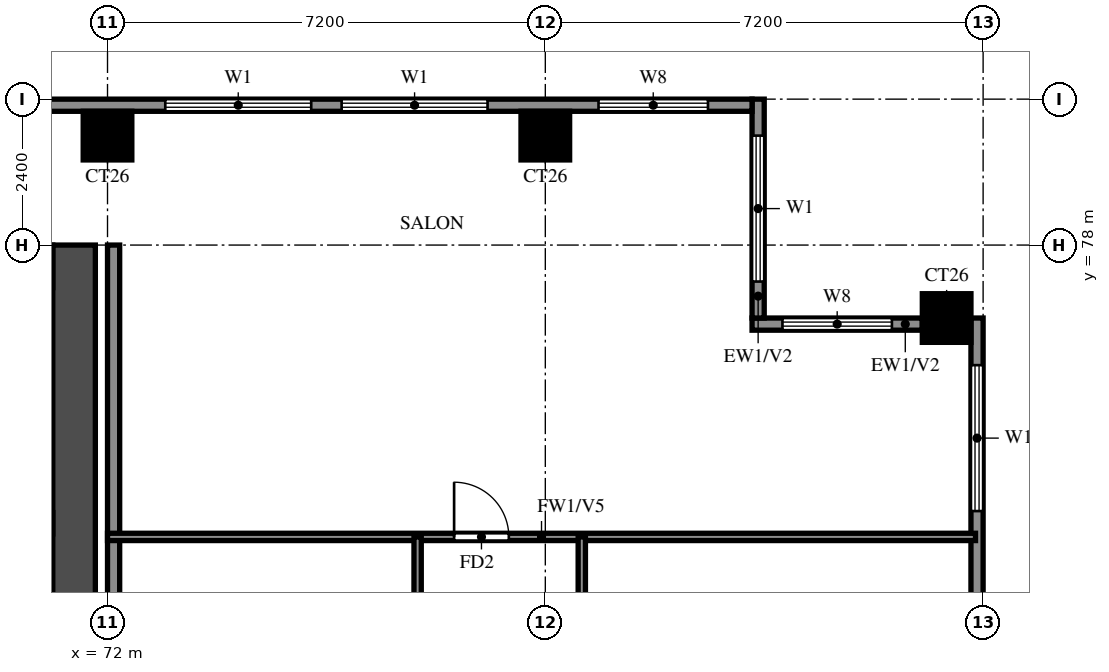
"""IFC4 building model, lengths in metres.
Left out: names, types, materials, properties, quantities, classifications, styles, units other than length and angle.
Written with IfcOpenShell. Run it as: python <this file> out.ifc"""

import sys

from ifc_helpers import new_model, si_unit, direction, frame, frame_2d, origin, origin_2d, place, context, subcontext, project, spatial, rectangle, extrude, source, transform, mapped, element, fill, save


model = new_model("IFC4")
c1 = context("Model", 3, precision=1e-05, world=origin(), true_north=direction((0.0, 1.0)))
c2 = subcontext(c1, "Body", "Model", "MODEL_VIEW")
j1 = project(units=[si_unit("LENGTHUNIT", "METRE"), si_unit("PLANEANGLEUNIT", "RADIAN")], contexts=[c1])
p1 = place(None, origin())
s1 = spatial("IfcSite", under=j1, at=p1, CompositionType="ELEMENT")
p2 = place(p1, origin())
s2 = spatial("IfcBuilding", under=s1, at=p2, CompositionType="ELEMENT")
p3 = place(p2, frame((0.0, 0.0, 181.5)))
s3 = spatial("IfcBuildingStorey", under=s2, at=p3, CompositionType="ELEMENT", Elevation=181.5)
m1 = source(origin(), c2, "Body", "SweptSolid", [
    extrude(rectangle(XDim=0.8, YDim=0.8, at=origin_2d()), origin(), (0.0, 0.0, 1.0), 3.2),
])
for number, where, z_axis, x_axis in (
    (1, (85.8, 76.8, 0.0), (0.0, 0.0, 1.0), (1.0, 0.0, 0.0)),
    (2, (72.0, 79.8, 0.0), (0.0, 0.0, 1.0), (1.0, 0.0, 0.0)),
    (3, (79.2, 79.8, 0.0), (0.0, 0.0, 1.0), (1.0, 0.0, 0.0)),
):
    element("IfcColumn", number, at=place(p3, frame(where, z_axis=z_axis, x_axis=x_axis)), inside=s3, PredefinedType="COLUMN", context=c2, shape_type="MappedRepresentation", body=[
        mapped(m1, transform((0.0, 0.0, 0.0))),
    ])
p4 = place(p3, frame((71.45, 66.1, 0.0), z_axis=(0.0, 0.0, 1.0), x_axis=(0.0, 1.0, 0.0)))
e4 = element("IfcWall", 4, at=p4, inside=s3, PredefinedType="SHEAR", context=c2, shape_type="SweptSolid", body=[
    extrude(rectangle(XDim=11.9, YDim=0.7, at=frame_2d((5.95, 0.0))), origin(), (0.0, 0.0, 1.0), 3.2),
])
p5 = place(p3, frame((29.7, 77.65, 0.0), z_axis=(0.0, 0.0, 1.0), x_axis=(1.0, 0.0, 0.0)))
e5 = element("IfcWall", 5, at=p5, inside=s3, PredefinedType="SHEAR", context=c2, shape_type="SweptSolid", body=[
    extrude(rectangle(XDim=41.4, YDim=0.7, at=frame_2d((20.7, 0.0))), origin(), (0.0, 0.0, 1.0), 3.2),
])
p6 = place(p3, frame((86.3, 62.4, 0.0), z_axis=(0.0, 0.0, 1.0), x_axis=(0.0, 1.0, 0.0)))
e6 = element("IfcWall", 6, at=p6, inside=s3, PredefinedType="SOLIDWALL", context=c2, shape_type="SweptSolid", body=[
    extrude(rectangle(XDim=14.4, YDim=0.2, at=frame_2d((7.2, 0.0))), origin(), (0.0, 0.0, 1.0), 3.2),
])
p7 = place(p6, frame((0.95, 0.0, 0.6)))
e7 = element("IfcOpeningElement", 7, at=p7, cuts=e6, PredefinedType="OPENING", context=c2, shape_type="SweptSolid", body=[
    extrude(rectangle(XDim=2.4, YDim=2.4, at=frame_2d((1.2, 1.2))), frame((0.0, 0.11, 0.0), z_axis=(0.0, -1.0, 0.0), x_axis=(1.0, 0.0, 0.0)), (0.0, 0.0, 1.0), 0.22),
])
p8 = place(p6, frame((3.85, 0.0, 0.6)))
e8 = element("IfcOpeningElement", 8, at=p8, cuts=e6, PredefinedType="OPENING", context=c2, shape_type="SweptSolid", body=[
    extrude(rectangle(XDim=2.4, YDim=2.4, at=frame_2d((1.2, 1.2))), frame((0.0, 0.11, 0.0), z_axis=(0.0, -1.0, 0.0), x_axis=(1.0, 0.0, 0.0)), (0.0, 0.0, 1.0), 0.22),
])
p9 = place(p6, frame((8.725, 0.0, 1.5)))
e9 = element("IfcOpeningElement", 9, at=p9, cuts=e6, PredefinedType="OPENING", context=c2, shape_type="SweptSolid", body=[
    extrude(rectangle(XDim=0.9, YDim=0.9, at=frame_2d((0.45, 0.45))), frame((0.0, 0.11, 0.0), z_axis=(0.0, -1.0, 0.0), x_axis=(1.0, 0.0, 0.0)), (0.0, 0.0, 1.0), 0.22),
])
p10 = place(p6, frame((11.225, 0.0, 0.6)))
e10 = element("IfcOpeningElement", 10, at=p10, cuts=e6, PredefinedType="OPENING", context=c2, shape_type="SweptSolid", body=[
    extrude(rectangle(XDim=2.4, YDim=2.4, at=frame_2d((1.2, 1.2))), frame((0.0, 0.11, 0.0), z_axis=(0.0, -1.0, 0.0), x_axis=(1.0, 0.0, 0.0)), (0.0, 0.0, 1.0), 0.22),
])
p11 = place(p3, frame((85.4, 76.7, 0.0), z_axis=(0.0, 0.0, 1.0), x_axis=(-1.0, 0.0, 0.0)))
e11 = element("IfcWall", 11, at=p11, inside=s3, PredefinedType="SOLIDWALL", context=c2, shape_type="SweptSolid", body=[
    extrude(rectangle(XDim=2.8, YDim=0.2, at=frame_2d((1.4, 0.0))), origin(), (0.0, 0.0, 1.0), 3.2),
])
p12 = place(p11, frame((0.5, 0.0, 0.6)))
e12 = element("IfcOpeningElement", 12, at=p12, cuts=e11, PredefinedType="OPENING", context=c2, shape_type="SweptSolid", body=[
    extrude(rectangle(XDim=1.8, YDim=2.4, at=frame_2d((0.9, 1.2))), frame((0.0, 0.11, 0.0), z_axis=(0.0, -1.0, 0.0), x_axis=(1.0, 0.0, 0.0)), (0.0, 0.0, 1.0), 0.22),
])
p13 = place(p3, frame((82.7, 76.8, 0.0), z_axis=(0.0, 0.0, 1.0), x_axis=(0.0, 1.0, 0.0)))
e13 = element("IfcWall", 13, at=p13, inside=s3, PredefinedType="SOLIDWALL", context=c2, shape_type="SweptSolid", body=[
    extrude(rectangle(XDim=3.6, YDim=0.2, at=frame_2d((1.8, 0.0))), origin(), (0.0, 0.0, 1.0), 3.2),
])
p14 = place(p13, frame((0.6, 0.0, 0.6)))
e14 = element("IfcOpeningElement", 14, at=p14, cuts=e13, PredefinedType="OPENING", context=c2, shape_type="SweptSolid", body=[
    extrude(rectangle(XDim=2.4, YDim=2.4, at=frame_2d((1.2, 1.2))), frame((0.0, 0.11, 0.0), z_axis=(0.0, -1.0, 0.0), x_axis=(1.0, 0.0, 0.0)), (0.0, 0.0, 1.0), 0.22),
])
p15 = place(p3, frame((82.6, 80.3, 0.0), z_axis=(0.0, 0.0, 1.0), x_axis=(-1.0, 0.0, 0.0)))
e15 = element("IfcWall", 15, at=p15, inside=s3, PredefinedType="SOLIDWALL", context=c2, shape_type="SweptSolid", body=[
    extrude(rectangle(XDim=64.6, YDim=0.2, at=frame_2d((32.3, 0.0))), origin(), (0.0, 0.0, 1.0), 3.2),
])
p16 = place(p15, frame((54.7, 0.0, 0.0)))
e16 = element("IfcOpeningElement", 16, at=p16, cuts=e15, PredefinedType="OPENING", context=c2, shape_type="SweptSolid", body=[
    extrude(rectangle(XDim=1.8, YDim=2.4, at=frame_2d((0.9, 1.2))), frame((0.0, 0.11, 0.0), z_axis=(0.0, -1.0, 0.0), x_axis=(1.0, 0.0, 0.0)), (0.0, 0.0, 1.0), 0.22),
])
p17 = place(p15, frame((56.95, 0.0, 0.6)))
e17 = element("IfcOpeningElement", 17, at=p17, cuts=e15, PredefinedType="OPENING", context=c2, shape_type="SweptSolid", body=[
    extrude(rectangle(XDim=0.9, YDim=2.4, at=frame_2d((0.45, 1.2))), frame((0.0, 0.11, 0.0), z_axis=(0.0, -1.0, 0.0), x_axis=(1.0, 0.0, 0.0)), (0.0, 0.0, 1.0), 0.22),
])
p18 = place(p15, frame((58.725, 0.0, 0.6)))
e18 = element("IfcOpeningElement", 18, at=p18, cuts=e15, PredefinedType="OPENING", context=c2, shape_type="SweptSolid", body=[
    extrude(rectangle(XDim=1.8, YDim=2.4, at=frame_2d((0.9, 1.2))), frame((0.0, 0.11, 0.0), z_axis=(0.0, -1.0, 0.0), x_axis=(1.0, 0.0, 0.0)), (0.0, 0.0, 1.0), 0.22),
])
p19 = place(p15, frame((61.975, 0.0, 0.6)))
e19 = element("IfcOpeningElement", 19, at=p19, cuts=e15, PredefinedType="OPENING", context=c2, shape_type="SweptSolid", body=[
    extrude(rectangle(XDim=1.8, YDim=2.4, at=frame_2d((0.9, 1.2))), frame((0.0, 0.11, 0.0), z_axis=(0.0, -1.0, 0.0), x_axis=(1.0, 0.0, 0.0)), (0.0, 0.0, 1.0), 0.22),
])
p20 = place(p15, frame((0.725, 0.0, 0.6)))
e20 = element("IfcOpeningElement", 20, at=p20, cuts=e15, PredefinedType="OPENING", context=c2, shape_type="SweptSolid", body=[
    extrude(rectangle(XDim=1.8, YDim=2.4, at=frame_2d((0.9, 1.2))), frame((0.0, 0.11, 0.0), z_axis=(0.0, -1.0, 0.0), x_axis=(1.0, 0.0, 0.0)), (0.0, 0.0, 1.0), 0.22),
])
p21 = place(p15, frame((4.35, 0.0, 0.6)))
e21 = element("IfcOpeningElement", 21, at=p21, cuts=e15, PredefinedType="OPENING", context=c2, shape_type="SweptSolid", body=[
    extrude(rectangle(XDim=2.4, YDim=2.4, at=frame_2d((1.2, 1.2))), frame((0.0, 0.11, 0.0), z_axis=(0.0, -1.0, 0.0), x_axis=(1.0, 0.0, 0.0)), (0.0, 0.0, 1.0), 0.22),
])
p22 = place(p15, frame((7.25, 0.0, 0.6)))
e22 = element("IfcOpeningElement", 22, at=p22, cuts=e15, PredefinedType="OPENING", context=c2, shape_type="SweptSolid", body=[
    extrude(rectangle(XDim=2.4, YDim=2.4, at=frame_2d((1.2, 1.2))), frame((0.0, 0.11, 0.0), z_axis=(0.0, -1.0, 0.0), x_axis=(1.0, 0.0, 0.0)), (0.0, 0.0, 1.0), 0.22),
])
p23 = place(p3, frame((72.1, 62.4, 0.0), z_axis=(0.0, 0.0, 1.0), x_axis=(0.0, 1.0, 0.0)))
e23 = element("IfcWall", 23, at=p23, inside=s3, PredefinedType="SOLIDWALL", context=c2, shape_type="SweptSolid", body=[
    extrude(rectangle(XDim=15.6, YDim=0.2, at=frame_2d((7.8, 0.0))), origin(), (0.0, 0.0, 1.0), 3.2),
])
p24 = place(p3, frame((72.0, 73.2, 0.0), z_axis=(0.0, 0.0, 1.0), x_axis=(1.0, 0.0, 0.0)))
e24 = element("IfcWall", 24, at=p24, inside=s3, PredefinedType="PARTITIONING", context=c2, shape_type="SweptSolid", body=[
    extrude(rectangle(XDim=14.275, YDim=0.12, at=frame_2d((7.137, 0.0))), origin(), (0.0, 0.0, 1.0), 2.3),
])
p25 = place(p24, frame((5.7, 0.0, 0.0)))
e25 = element("IfcOpeningElement", 25, at=p25, cuts=e24, PredefinedType="OPENING", context=c2, shape_type="SweptSolid", body=[
    extrude(rectangle(XDim=0.9, YDim=2.1, at=frame_2d((0.45, 1.05))), frame((0.0, 0.07, 0.0), z_axis=(0.0, -1.0, 0.0), x_axis=(1.0, 0.0, 0.0)), (0.0, 0.0, 1.0), 0.14),
])
p26 = place(p3, frame((77.1, 61.2, 0.0), z_axis=(0.0, 0.0, 1.0), x_axis=(0.0, 1.0, 0.0)))
e26 = element("IfcWall", 26, at=p26, inside=s3, PredefinedType="PARTITIONING", context=c2, shape_type="SweptSolid", body=[
    extrude(rectangle(XDim=12.0, YDim=0.12, at=frame_2d((6.0, 0.0))), origin(), (0.0, 0.0, 1.0), 3.2),
])
p27 = place(p26, frame((4.55, 0.0, 0.0)))
e27 = element("IfcOpeningElement", 27, at=p27, cuts=e26, PredefinedType="OPENING", context=c2, shape_type="SweptSolid", body=[
    extrude(rectangle(XDim=0.9, YDim=2.1, at=frame_2d((0.45, 1.05))), frame((0.0, 0.07, 0.0), z_axis=(0.0, -1.0, 0.0), x_axis=(1.0, 0.0, 0.0)), (0.0, 0.0, 1.0), 0.14),
])
p28 = place(p26, frame((9.3, 0.0, 0.0)))
e28 = element("IfcOpeningElement", 28, at=p28, cuts=e26, PredefinedType="OPENING", context=c2, shape_type="SweptSolid", body=[
    extrude(rectangle(XDim=0.8, YDim=2.1, at=frame_2d((0.4, 1.05))), frame((0.0, 0.07, 0.0), z_axis=(0.0, -1.0, 0.0), x_axis=(1.0, 0.0, 0.0)), (0.0, 0.0, 1.0), 0.14),
])
p29 = place(p3, frame((79.8, 69.6, 0.0), z_axis=(0.0, 0.0, 1.0), x_axis=(0.0, 1.0, 0.0)))
e29 = element("IfcWall", 29, at=p29, inside=s3, PredefinedType="PARTITIONING", context=c2, shape_type="SweptSolid", body=[
    extrude(rectangle(XDim=3.6, YDim=0.12, at=frame_2d((1.8, 0.0))), origin(), (0.0, 0.0, 1.0), 3.2),
])
p30 = place(p10, origin())
e30 = element("IfcWindow", 30, at=p30, inside=s3, PartitioningType="DOUBLE_PANEL_VERTICAL", PredefinedType="WINDOW", context=c2, shape_type="SweptSolid", body=[
    extrude(rectangle(XDim=2.4, YDim=2.4, at=frame_2d((1.2, 1.2))), frame((0.0, 0.03, 0.0), z_axis=(0.0, -1.0, 0.0), x_axis=(1.0, 0.0, 0.0)), (0.0, 0.0, 1.0), 0.06),
])
fill(e10, e30)
p31 = place(p12, origin())
e31 = element("IfcWindow", 31, at=p31, inside=s3, PartitioningType="DOUBLE_PANEL_VERTICAL", PredefinedType="WINDOW", context=c2, shape_type="SweptSolid", body=[
    extrude(rectangle(XDim=1.8, YDim=2.4, at=frame_2d((0.9, 1.2))), frame((0.0, 0.03, 0.0), z_axis=(0.0, -1.0, 0.0), x_axis=(1.0, 0.0, 0.0)), (0.0, 0.0, 1.0), 0.06),
])
fill(e12, e31)
p32 = place(p14, origin())
e32 = element("IfcWindow", 32, at=p32, inside=s3, PartitioningType="DOUBLE_PANEL_VERTICAL", PredefinedType="WINDOW", context=c2, shape_type="SweptSolid", body=[
    extrude(rectangle(XDim=2.4, YDim=2.4, at=frame_2d((1.2, 1.2))), frame((0.0, 0.03, 0.0), z_axis=(0.0, -1.0, 0.0), x_axis=(1.0, 0.0, 0.0)), (0.0, 0.0, 1.0), 0.06),
])
fill(e14, e32)
p33 = place(p20, origin())
e33 = element("IfcWindow", 33, at=p33, inside=s3, PartitioningType="DOUBLE_PANEL_VERTICAL", PredefinedType="WINDOW", context=c2, shape_type="SweptSolid", body=[
    extrude(rectangle(XDim=1.8, YDim=2.4, at=frame_2d((0.9, 1.2))), frame((0.0, 0.03, 0.0), z_axis=(0.0, -1.0, 0.0), x_axis=(1.0, 0.0, 0.0)), (0.0, 0.0, 1.0), 0.06),
])
fill(e20, e33)
p34 = place(p21, origin())
e34 = element("IfcWindow", 34, at=p34, inside=s3, PartitioningType="DOUBLE_PANEL_VERTICAL", PredefinedType="WINDOW", context=c2, shape_type="SweptSolid", body=[
    extrude(rectangle(XDim=2.4, YDim=2.4, at=frame_2d((1.2, 1.2))), frame((0.0, 0.03, 0.0), z_axis=(0.0, -1.0, 0.0), x_axis=(1.0, 0.0, 0.0)), (0.0, 0.0, 1.0), 0.06),
])
fill(e21, e34)
p35 = place(p22, origin())
e35 = element("IfcWindow", 35, at=p35, inside=s3, PartitioningType="DOUBLE_PANEL_VERTICAL", PredefinedType="WINDOW", context=c2, shape_type="SweptSolid", body=[
    extrude(rectangle(XDim=2.4, YDim=2.4, at=frame_2d((1.2, 1.2))), frame((0.0, 0.03, 0.0), z_axis=(0.0, -1.0, 0.0), x_axis=(1.0, 0.0, 0.0)), (0.0, 0.0, 1.0), 0.06),
])
fill(e22, e35)
p36 = place(p25, origin())
e36 = element("IfcDoor", 36, at=p36, inside=s3, OperationType="SINGLE_SWING_LEFT", PredefinedType="DOOR", context=c2, shape_type="SweptSolid", body=[
    extrude(rectangle(XDim=0.9, YDim=2.1, at=frame_2d((0.45, 1.05))), frame((0.0, 0.025, 0.0), z_axis=(0.0, -1.0, 0.0), x_axis=(1.0, 0.0, 0.0)), (0.0, 0.0, 1.0), 0.05),
])
fill(e25, e36)
save(model, sys.argv[1])
